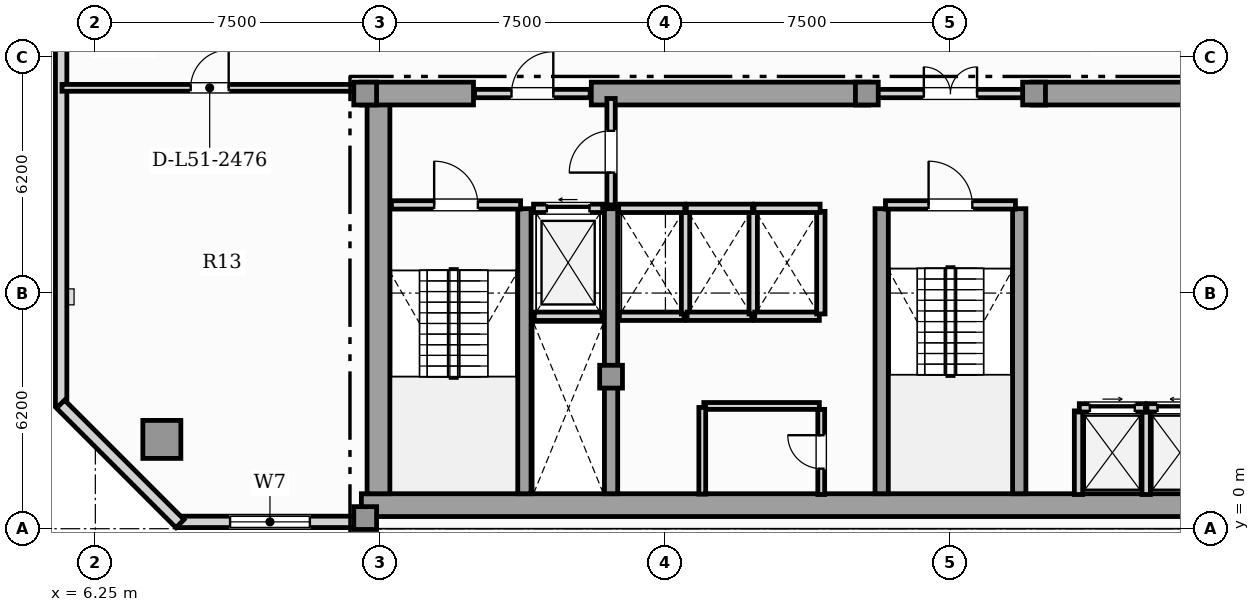
"""IFC4 building model, lengths in metres.
Left out: names, types, materials, properties, quantities, classifications, styles, units other than length and angle.
Written with IfcOpenShell. Run it as: python <this file> out.ifc"""

import sys

from ifc_helpers import new_model, si_unit, direction, frame, frame_2d, origin, origin_2d, place, context, subcontext, project, spatial, rectangle, hollow_rectangle, extrude, element, fill, save


model = new_model("IFC4")
c1 = context("Model", 3, precision=1e-05, world=origin(), true_north=direction((0.0, 1.0)))
c2 = subcontext(c1, "Body", "Model", "MODEL_VIEW")
j1 = project(units=[si_unit("LENGTHUNIT", "METRE"), si_unit("PLANEANGLEUNIT", "RADIAN")], contexts=[c1])
p1 = place(None, origin())
s1 = spatial("IfcSite", under=j1, at=p1, CompositionType="ELEMENT")
p2 = place(p1, origin())
s2 = spatial("IfcBuilding", under=s1, at=p2, CompositionType="ELEMENT")
p3 = place(p2, frame((0.0, 0.0, 208.0)))
s3 = spatial("IfcBuildingStorey", under=s2, at=p3, CompositionType="ELEMENT", Elevation=208.0)
p4 = place(p3, frame((13.25, 0.62, 0.0), z_axis=(0.0, 0.0, 1.0), x_axis=(1.0, 0.0, 0.0)))
e1 = element("IfcWall", 1, at=p4, inside=s3, PredefinedType="SHEAR", context=c2, shape_type="SweptSolid", body=[
    extrude(rectangle(XDim=31.0, YDim=0.6, at=frame_2d((15.5, 0.0))), origin(), (0.0, 0.0, 1.0), 3.63),
])
p5 = place(p3, frame((13.7, 0.92, 0.0), z_axis=(0.0, 0.0, 1.0), x_axis=(0.0, 1.0, 0.0)))
e2 = element("IfcWall", 2, at=p5, inside=s3, PredefinedType="SHEAR", context=c2, shape_type="SweptSolid", body=[
    extrude(rectangle(XDim=10.53, YDim=0.6, at=frame_2d((5.265, 0.0))), origin(), (0.0, 0.0, 1.0), 3.63),
])
p6 = place(p3, frame((13.25, 11.45, 0.0), z_axis=(0.0, 0.0, 1.0), x_axis=(1.0, 0.0, 0.0)))
e3 = element("IfcWall", 3, at=p6, inside=s3, PredefinedType="SHEAR", context=c2, shape_type="SweptSolid", body=[
    extrude(rectangle(XDim=2.95, YDim=0.6, at=frame_2d((1.475, 0.0))), origin(), (0.0, 0.0, 1.0), 3.63),
])
for number, where, z_axis, x_axis in (
    (4, (19.3, 11.45, 0.0), (0.0, 0.0, 1.0), (1.0, 0.0, 0.0)),
    (5, (30.9, 11.45, 0.0), (0.0, 0.0, 1.0), (1.0, 0.0, 0.0)),
):
    element("IfcWall", number, at=place(p3, frame(where, z_axis=z_axis, x_axis=x_axis)), inside=s3, PredefinedType="SHEAR", context=c2, shape_type="SweptSolid", body=[
        extrude(rectangle(XDim=7.3, YDim=0.6, at=frame_2d((3.65, 0.0))), origin(), (0.0, 0.0, 1.0), 3.63),
    ])
for number, where, z_axis, x_axis in (
    (6, (17.54, 0.92, 0.0), (0.0, 0.0, 1.0), (0.0, 1.0, 0.0)),
    (7, (19.82, 0.92, 0.0), (0.0, 0.0, 1.0), (0.0, 1.0, 0.0)),
    (8, (26.94, 0.92, 0.0), (0.0, 0.0, 1.0), (0.0, 1.0, 0.0)),
    (9, (30.56, 0.92, 0.0), (0.0, 0.0, 1.0), (0.0, 1.0, 0.0)),
):
    element("IfcWall", number, at=place(p3, frame(where, z_axis=z_axis, x_axis=x_axis)), inside=s3, PredefinedType="SHEAR", context=c2, shape_type="SweptSolid", body=[
        extrude(rectangle(XDim=7.5, YDim=0.35, at=frame_2d((3.75, 0.0))), origin(), (0.0, 0.0, 1.0), 3.63),
    ])
for number, where, z_axis, x_axis in (
    (10, (13.35, 0.28, 0.0), (0.0, 0.0, 1.0), (1.0, 0.0, 0.0)),
    (11, (13.35, 11.45, 0.0), (0.0, 0.0, 1.0), (1.0, 0.0, 0.0)),
    (12, (19.82, 4.0, 0.0), (0.0, 0.0, 1.0), (1.0, 0.0, 0.0)),
    (13, (26.55, 11.45, 0.0), (0.0, 0.0, 1.0), (1.0, 0.0, 0.0)),
    (14, (30.95, 11.45, 0.0), (0.0, 0.0, 1.0), (1.0, 0.0, 0.0)),
):
    element("IfcColumn", number, at=place(p3, frame(where, z_axis=z_axis, x_axis=x_axis)), inside=s3, PredefinedType="COLUMN", context=c2, shape_type="SweptSolid", body=[
        extrude(rectangle(XDim=0.6, YDim=0.6, at=origin_2d()), origin(), (0.0, 0.0, 1.0), 3.85),
    ])
p7 = place(p3, frame((8.0, 2.35, 0.0), z_axis=(0.0, 0.0, 1.0), x_axis=(1.0, 0.0, 0.0)))
e15 = element("IfcColumn", 15, at=p7, inside=s3, PredefinedType="USERDEFINED", context=c2, shape_type="SweptSolid", body=[
    extrude(hollow_rectangle(XDim=1.0, YDim=1.0, WallThickness=0.06, at=origin_2d()), origin(), (0.0, 0.0, 1.0), 3.85),
])
p8 = place(p3, frame((8.44, 0.18, 0.0), z_axis=(0.0, 0.0, 1.0), x_axis=(1.0, 0.0, 0.0)))
e16 = element("IfcWall", 16, at=p8, inside=s3, PredefinedType="SOLIDWALL", context=c2, shape_type="SweptSolid", body=[
    extrude(rectangle(XDim=4.81, YDim=0.3, at=frame_2d((2.405, 0.0))), origin(), (0.0, 0.0, 1.0), 3.63),
])
p9 = place(p8, frame((1.355, 0.0, 0.85)))
e17 = element("IfcOpeningElement", 17, at=p9, cuts=e16, PredefinedType="OPENING", context=c2, shape_type="SweptSolid", body=[
    extrude(rectangle(XDim=2.1, YDim=2.05, at=frame_2d((1.05, 1.025))), frame((0.0, 0.16, 0.0), z_axis=(0.0, -1.0, 0.0), x_axis=(1.0, 0.0, 0.0)), (0.0, 0.0, 1.0), 0.32),
])
p10 = place(p3, frame((5.35, 37.16, 0.0), z_axis=(0.0, 0.0, 1.0), x_axis=(0.0, -1.0, 0.0)))
e18 = element("IfcWall", 18, at=p10, inside=s3, PredefinedType="SOLIDWALL", context=c2, shape_type="SweptSolid", body=[
    extrude(rectangle(XDim=33.92, YDim=0.3, at=frame_2d((16.96, 0.0))), origin(), (0.0, 0.0, 1.0), 3.63),
])
p11 = place(p10, frame((2.46, 0.0, 0.95)))
e19 = element("IfcOpeningElement", 19, at=p11, cuts=e18, PredefinedType="OPENING", context=c2, shape_type="SweptSolid", body=[
    extrude(rectangle(XDim=0.9, YDim=1.5, at=frame_2d((0.45, 0.75))), frame((0.0, 0.16, 0.0), z_axis=(0.0, -1.0, 0.0), x_axis=(1.0, 0.0, 0.0)), (0.0, 0.0, 1.0), 0.32),
])
p12 = place(p10, frame((17.639, 0.0, 0.88)))
e20 = element("IfcOpeningElement", 20, at=p12, cuts=e18, PredefinedType="OPENING", context=c2, shape_type="SweptSolid", body=[
    extrude(rectangle(XDim=1.65, YDim=2.0, at=frame_2d((0.825, 1.0))), frame((0.0, 0.16, 0.0), z_axis=(0.0, -1.0, 0.0), x_axis=(1.0, 0.0, 0.0)), (0.0, 0.0, 1.0), 0.32),
])
p13 = place(p10, frame((9.212, 0.0, 0.88)))
e21 = element("IfcOpeningElement", 21, at=p13, cuts=e18, PredefinedType="OPENING", context=c2, shape_type="SweptSolid", body=[
    extrude(rectangle(XDim=1.65, YDim=2.0, at=frame_2d((0.825, 1.0))), frame((0.0, 0.16, 0.0), z_axis=(0.0, -1.0, 0.0), x_axis=(1.0, 0.0, 0.0)), (0.0, 0.0, 1.0), 0.32),
])
p14 = place(p3, frame((5.334, 3.278, 0.0), z_axis=(0.0, 0.0, 1.0), x_axis=(0.707106781187, -0.707106781187, 0.0)))
e22 = element("IfcWall", 22, at=p14, inside=s3, PredefinedType="SOLIDWALL", context=c2, shape_type="SweptSolid", body=[
    extrude(rectangle(XDim=4.445, YDim=0.3, at=frame_2d((2.223, 0.0))), origin(), (0.0, 0.0, 1.0), 3.63),
])
p15 = place(p3, frame((17.8, 5.59, 0.0), z_axis=(0.0, 0.0, 1.0), x_axis=(1.0, 0.0, 0.0)))
e23 = element("IfcWall", 23, at=p15, inside=s3, PredefinedType="SOLIDWALL", context=c2, shape_type="SweptSolid", body=[
    extrude(rectangle(XDim=1.78, YDim=0.22, at=frame_2d((0.89, 0.0))), origin(), (0.0, 0.0, 1.0), 3.63),
])
p16 = place(p3, frame((17.78, 8.43, 0.0), z_axis=(0.0, 0.0, 1.0), x_axis=(1.0, 0.0, 0.0)))
e24 = element("IfcWall", 24, at=p16, inside=s3, PredefinedType="SOLIDWALL", context=c2, shape_type="SweptSolid", body=[
    extrude(rectangle(XDim=1.82, YDim=0.22, at=frame_2d((0.91, 0.0))), origin(), (0.0, 0.0, 1.0), 3.63),
])
p17 = place(p16, frame((0.35, 0.0, 0.0)))
e25 = element("IfcOpeningElement", 25, at=p17, cuts=e24, PredefinedType="OPENING", context=c2, shape_type="SweptSolid", body=[
    extrude(rectangle(XDim=1.12, YDim=2.25, at=frame_2d((0.56, 1.125))), frame((0.0, 0.12, 0.0), z_axis=(0.0, -1.0, 0.0), x_axis=(1.0, 0.0, 0.0)), (0.0, 0.0, 1.0), 0.24),
])
for number, where, z_axis, x_axis in (
    (26, (32.12, 0.9, 0.0), (0.0, 0.0, 1.0), (0.0, 1.0, 0.0)),
    (27, (33.9, 0.9, 0.0), (0.0, 0.0, 1.0), (0.0, 1.0, 0.0)),
):
    element("IfcWall", number, at=place(p3, frame(where, z_axis=z_axis, x_axis=x_axis)), inside=s3, PredefinedType="SOLIDWALL", context=c2, shape_type="SweptSolid", body=[
        extrude(rectangle(XDim=2.2, YDim=0.22, at=frame_2d((1.1, 0.0))), origin(), (0.0, 0.0, 1.0), 3.63),
    ])
p18 = place(p3, frame((32.14, 3.18, 0.0), z_axis=(0.0, 0.0, 1.0), x_axis=(1.0, 0.0, 0.0)))
e28 = element("IfcWall", 28, at=p18, inside=s3, PredefinedType="SOLIDWALL", context=c2, shape_type="SweptSolid", body=[
    extrude(rectangle(XDim=1.74, YDim=0.22, at=frame_2d((0.87, 0.0))), origin(), (0.0, 0.0, 1.0), 3.63),
])
p19 = place(p18, frame((0.28, 0.0, 0.0)))
e29 = element("IfcOpeningElement", 29, at=p19, cuts=e28, PredefinedType="OPENING", context=c2, shape_type="SweptSolid", body=[
    extrude(rectangle(XDim=1.18, YDim=2.2, at=frame_2d((0.59, 1.1))), frame((0.0, 0.12, 0.0), z_axis=(0.0, -1.0, 0.0), x_axis=(1.0, 0.0, 0.0)), (0.0, 0.0, 1.0), 0.24),
])
p20 = place(p3, frame((33.92, 3.18, 0.0), z_axis=(0.0, 0.0, 1.0), x_axis=(1.0, 0.0, 0.0)))
e30 = element("IfcWall", 30, at=p20, inside=s3, PredefinedType="SOLIDWALL", context=c2, shape_type="SweptSolid", body=[
    extrude(rectangle(XDim=1.74, YDim=0.22, at=frame_2d((0.87, 0.0))), origin(), (0.0, 0.0, 1.0), 3.63),
])
p21 = place(p20, frame((0.28, 0.0, 0.0)))
e31 = element("IfcOpeningElement", 31, at=p21, cuts=e30, PredefinedType="OPENING", context=c2, shape_type="SweptSolid", body=[
    extrude(rectangle(XDim=1.18, YDim=2.2, at=frame_2d((0.59, 1.1))), frame((0.0, 0.12, 0.0), z_axis=(0.0, -1.0, 0.0), x_axis=(1.0, 0.0, 0.0)), (0.0, 0.0, 1.0), 0.24),
])
p22 = place(p3, frame((20.04, 5.59, 0.0), z_axis=(0.0, 0.0, 1.0), x_axis=(1.0, 0.0, 0.0)))
e32 = element("IfcWall", 32, at=p22, inside=s3, PredefinedType="SOLIDWALL", context=c2, shape_type="SweptSolid", body=[
    extrude(rectangle(XDim=1.7, YDim=0.22, at=frame_2d((0.85, 0.0))), origin(), (0.0, 0.0, 1.0), 3.63),
])
p23 = place(p3, frame((21.78, 5.65, 0.0), z_axis=(0.0, 0.0, 1.0), x_axis=(0.0, 1.0, 0.0)))
e33 = element("IfcWall", 33, at=p23, inside=s3, PredefinedType="SOLIDWALL", context=c2, shape_type="SweptSolid", body=[
    extrude(rectangle(XDim=2.7, YDim=0.22, at=frame_2d((1.35, 0.0))), origin(), (0.0, 0.0, 1.0), 3.63),
])
p24 = place(p3, frame((20.02, 8.43, 0.0), z_axis=(0.0, 0.0, 1.0), x_axis=(1.0, 0.0, 0.0)))
e34 = element("IfcWall", 34, at=p24, inside=s3, PredefinedType="SOLIDWALL", context=c2, shape_type="SweptSolid", body=[
    extrude(rectangle(XDim=1.74, YDim=0.22, at=frame_2d((0.87, 0.0))), origin(), (0.0, 0.0, 1.0), 3.63),
])
p25 = place(p3, frame((21.82, 5.59, 0.0), z_axis=(0.0, 0.0, 1.0), x_axis=(1.0, 0.0, 0.0)))
e35 = element("IfcWall", 35, at=p25, inside=s3, PredefinedType="SOLIDWALL", context=c2, shape_type="SweptSolid", body=[
    extrude(rectangle(XDim=1.7, YDim=0.22, at=frame_2d((0.85, 0.0))), origin(), (0.0, 0.0, 1.0), 3.63),
])
p26 = place(p3, frame((23.56, 5.65, 0.0), z_axis=(0.0, 0.0, 1.0), x_axis=(0.0, 1.0, 0.0)))
e36 = element("IfcWall", 36, at=p26, inside=s3, PredefinedType="SOLIDWALL", context=c2, shape_type="SweptSolid", body=[
    extrude(rectangle(XDim=2.7, YDim=0.22, at=frame_2d((1.35, 0.0))), origin(), (0.0, 0.0, 1.0), 3.63),
])
p27 = place(p3, frame((21.8, 8.43, 0.0), z_axis=(0.0, 0.0, 1.0), x_axis=(1.0, 0.0, 0.0)))
e37 = element("IfcWall", 37, at=p27, inside=s3, PredefinedType="SOLIDWALL", context=c2, shape_type="SweptSolid", body=[
    extrude(rectangle(XDim=1.74, YDim=0.22, at=frame_2d((0.87, 0.0))), origin(), (0.0, 0.0, 1.0), 3.63),
])
p28 = place(p3, frame((23.6, 5.59, 0.0), z_axis=(0.0, 0.0, 1.0), x_axis=(1.0, 0.0, 0.0)))
e38 = element("IfcWall", 38, at=p28, inside=s3, PredefinedType="SOLIDWALL", context=c2, shape_type="SweptSolid", body=[
    extrude(rectangle(XDim=1.7, YDim=0.22, at=frame_2d((0.85, 0.0))), origin(), (0.0, 0.0, 1.0), 3.63),
])
p29 = place(p3, frame((25.34, 5.65, 0.0), z_axis=(0.0, 0.0, 1.0), x_axis=(0.0, 1.0, 0.0)))
e39 = element("IfcWall", 39, at=p29, inside=s3, PredefinedType="SOLIDWALL", context=c2, shape_type="SweptSolid", body=[
    extrude(rectangle(XDim=2.7, YDim=0.22, at=frame_2d((1.35, 0.0))), origin(), (0.0, 0.0, 1.0), 3.63),
])
p30 = place(p3, frame((23.58, 8.43, 0.0), z_axis=(0.0, 0.0, 1.0), x_axis=(1.0, 0.0, 0.0)))
e40 = element("IfcWall", 40, at=p30, inside=s3, PredefinedType="SOLIDWALL", context=c2, shape_type="SweptSolid", body=[
    extrude(rectangle(XDim=1.74, YDim=0.22, at=frame_2d((0.87, 0.0))), origin(), (0.0, 0.0, 1.0), 3.63),
])
p31 = place(p3, frame((14.04, 8.52, 0.0), z_axis=(0.0, 0.0, 1.0), x_axis=(1.0, 0.0, 0.0)))
e41 = element("IfcWall", 41, at=p31, inside=s3, PredefinedType="SOLIDWALL", context=c2, shape_type="SweptSolid", body=[
    extrude(rectangle(XDim=3.4, YDim=0.22, at=frame_2d((1.7, 0.0))), origin(), (0.0, 0.0, 1.0), 3.63),
])
p32 = place(p31, frame((1.125, 0.0, 0.0)))
e42 = element("IfcOpeningElement", 42, at=p32, cuts=e41, PredefinedType="OPENING", context=c2, shape_type="SweptSolid", body=[
    extrude(rectangle(XDim=1.15, YDim=2.2, at=frame_2d((0.575, 1.1))), frame((0.0, 0.12, 0.0), z_axis=(0.0, -1.0, 0.0), x_axis=(1.0, 0.0, 0.0)), (0.0, 0.0, 1.0), 0.24),
])
p33 = place(p3, frame((27.04, 8.52, 0.0), z_axis=(0.0, 0.0, 1.0), x_axis=(1.0, 0.0, 0.0)))
e43 = element("IfcWall", 43, at=p33, inside=s3, PredefinedType="SOLIDWALL", context=c2, shape_type="SweptSolid", body=[
    extrude(rectangle(XDim=3.42, YDim=0.22, at=frame_2d((1.71, 0.0))), origin(), (0.0, 0.0, 1.0), 3.63),
])
p34 = place(p33, frame((1.135, 0.0, 0.0)))
e44 = element("IfcOpeningElement", 44, at=p34, cuts=e43, PredefinedType="OPENING", context=c2, shape_type="SweptSolid", body=[
    extrude(rectangle(XDim=1.15, YDim=2.2, at=frame_2d((0.575, 1.1))), frame((0.0, 0.12, 0.0), z_axis=(0.0, -1.0, 0.0), x_axis=(1.0, 0.0, 0.0)), (0.0, 0.0, 1.0), 0.24),
])
p35 = place(p3, frame((19.82, 8.52, 0.0), z_axis=(0.0, 0.0, 1.0), x_axis=(0.0, 1.0, 0.0)))
e45 = element("IfcWall", 45, at=p35, inside=s3, PredefinedType="SOLIDWALL", context=c2, shape_type="SweptSolid", body=[
    extrude(rectangle(XDim=2.8, YDim=0.22, at=frame_2d((1.4, 0.0))), origin(), (0.0, 0.0, 1.0), 3.085),
])
p36 = place(p35, frame((0.85, 0.0, 0.0)))
e46 = element("IfcOpeningElement", 46, at=p36, cuts=e45, PredefinedType="OPENING", context=c2, shape_type="SweptSolid", body=[
    extrude(rectangle(XDim=1.1, YDim=2.2, at=frame_2d((0.55, 1.1))), frame((0.0, 0.12, 0.0), z_axis=(0.0, -1.0, 0.0), x_axis=(1.0, 0.0, 0.0)), (0.0, 0.0, 1.0), 0.24),
])
p37 = place(p3, frame((16.23, 11.45, 0.0), z_axis=(0.0, 0.0, 1.0), x_axis=(1.0, 0.0, 0.0)))
e47 = element("IfcWall", 47, at=p37, inside=s3, PredefinedType="SOLIDWALL", context=c2, shape_type="SweptSolid", body=[
    extrude(rectangle(XDim=3.04, YDim=0.22, at=frame_2d((1.52, 0.0))), origin(), (0.0, 0.0, 1.0), 3.63),
])
p38 = place(p37, frame((0.97, 0.0, 0.0)))
e48 = element("IfcOpeningElement", 48, at=p38, cuts=e47, PredefinedType="OPENING", context=c2, shape_type="SweptSolid", body=[
    extrude(rectangle(XDim=1.1, YDim=2.2, at=frame_2d((0.55, 1.1))), frame((0.0, 0.12, 0.0), z_axis=(0.0, -1.0, 0.0), x_axis=(1.0, 0.0, 0.0)), (0.0, 0.0, 1.0), 0.24),
])
p39 = place(p3, frame((26.63, 11.45, 0.0), z_axis=(0.0, 0.0, 1.0), x_axis=(1.0, 0.0, 0.0)))
e49 = element("IfcWall", 49, at=p39, inside=s3, PredefinedType="SOLIDWALL", context=c2, shape_type="SweptSolid", body=[
    extrude(rectangle(XDim=4.24, YDim=0.22, at=frame_2d((2.12, 0.0))), origin(), (0.0, 0.0, 1.0), 3.63),
])
p40 = place(p39, frame((1.42, 0.0, 0.0)))
e50 = element("IfcOpeningElement", 50, at=p40, cuts=e49, PredefinedType="OPENING", context=c2, shape_type="SweptSolid", body=[
    extrude(rectangle(XDim=1.4, YDim=2.2, at=frame_2d((0.7, 1.1))), frame((0.0, 0.12, 0.0), z_axis=(0.0, -1.0, 0.0), x_axis=(1.0, 0.0, 0.0)), (0.0, 0.0, 1.0), 0.24),
])
p41 = place(p3, frame((25.35, 0.9, 0.0), z_axis=(0.0, 0.0, 1.0), x_axis=(0.0, 1.0, 0.0)))
e51 = element("IfcWall", 51, at=p41, inside=s3, PredefinedType="PARTITIONING", context=c2, shape_type="SweptSolid", body=[
    extrude(rectangle(XDim=2.24, YDim=0.18, at=frame_2d((1.12, 0.0))), origin(), (0.0, 0.0, 1.0), 3.63),
])
p42 = place(p41, frame((0.68, 0.0, 0.0)))
e52 = element("IfcOpeningElement", 52, at=p42, cuts=e51, PredefinedType="OPENING", context=c2, shape_type="SweptSolid", body=[
    extrude(rectangle(XDim=0.88, YDim=2.05, at=frame_2d((0.44, 1.025))), frame((0.0, 0.1, 0.0), z_axis=(0.0, -1.0, 0.0), x_axis=(1.0, 0.0, 0.0)), (0.0, 0.0, 1.0), 0.2),
])
p43 = place(p3, frame((22.26, 3.23, 0.0), z_axis=(0.0, 0.0, 1.0), x_axis=(1.0, 0.0, 0.0)))
e53 = element("IfcWall", 53, at=p43, inside=s3, PredefinedType="PARTITIONING", context=c2, shape_type="SweptSolid", body=[
    extrude(rectangle(XDim=3.04, YDim=0.18, at=frame_2d((1.52, 0.0))), origin(), (0.0, 0.0, 1.0), 3.63),
])
p44 = place(p3, frame((22.22, 0.91, 0.0), z_axis=(0.0, 0.0, 1.0), x_axis=(0.0, 1.0, 0.0)))
e54 = element("IfcWall", 54, at=p44, inside=s3, PredefinedType="PARTITIONING", context=c2, shape_type="SweptSolid", body=[
    extrude(rectangle(XDim=2.28, YDim=0.18, at=frame_2d((1.14, 0.0))), origin(), (0.0, 0.0, 1.0), 3.63),
])
p45 = place(p3, frame((5.373, 11.6, 0.0), z_axis=(0.0, 0.0, 1.0), x_axis=(1.0, 0.0, 0.0)))
e55 = element("IfcWall", 55, at=p45, inside=s3, PredefinedType="PARTITIONING", context=c2, shape_type="SweptSolid", body=[
    extrude(rectangle(XDim=7.772, YDim=0.18, at=frame_2d((3.886, 0.0))), origin(), (0.0, 0.0, 1.0), 3.63),
])
p46 = place(p45, frame((3.386, 0.0, 0.0)))
e56 = element("IfcOpeningElement", 56, at=p46, cuts=e55, PredefinedType="OPENING", context=c2, shape_type="SweptSolid", body=[
    extrude(rectangle(XDim=1.0, YDim=2.15, at=frame_2d((0.5, 1.075))), frame((0.0, 0.1, 0.0), z_axis=(0.0, -1.0, 0.0), x_axis=(1.0, 0.0, 0.0)), (0.0, 0.0, 1.0), 0.2),
])
p47 = place(p9, origin())
e57 = element("IfcWindow", 57, at=p47, inside=s3, PartitioningType="SINGLE_PANEL", PredefinedType="WINDOW", context=c2, shape_type="SweptSolid", body=[
    extrude(rectangle(XDim=2.1, YDim=2.05, at=frame_2d((1.05, 1.025))), frame((0.0, 0.03, 0.0), z_axis=(0.0, -1.0, 0.0), x_axis=(1.0, 0.0, 0.0)), (0.0, 0.0, 1.0), 0.06),
])
fill(e17, e57)
p48 = place(p17, origin())
e58 = element("IfcDoor", 58, at=p48, inside=s3, OperationType="SLIDING_TO_LEFT", PredefinedType="DOOR", context=c2, shape_type="SweptSolid", body=[
    extrude(rectangle(XDim=1.12, YDim=2.25, at=frame_2d((0.56, 1.125))), frame((0.0, 0.025, 0.0), z_axis=(0.0, -1.0, 0.0), x_axis=(1.0, 0.0, 0.0)), (0.0, 0.0, 1.0), 0.05),
])
fill(e25, e58)
p49 = place(p19, origin())
e59 = element("IfcDoor", 59, at=p49, inside=s3, OperationType="SLIDING_TO_RIGHT", PredefinedType="DOOR", context=c2, shape_type="SweptSolid", body=[
    extrude(rectangle(XDim=1.18, YDim=2.2, at=frame_2d((0.59, 1.1))), frame((0.0, 0.025, 0.0), z_axis=(0.0, -1.0, 0.0), x_axis=(1.0, 0.0, 0.0)), (0.0, 0.0, 1.0), 0.05),
])
fill(e29, e59)
p50 = place(p21, origin())
e60 = element("IfcDoor", 60, at=p50, inside=s3, OperationType="SLIDING_TO_LEFT", PredefinedType="DOOR", context=c2, shape_type="SweptSolid", body=[
    extrude(rectangle(XDim=1.18, YDim=2.2, at=frame_2d((0.59, 1.1))), frame((0.0, 0.025, 0.0), z_axis=(0.0, -1.0, 0.0), x_axis=(1.0, 0.0, 0.0)), (0.0, 0.0, 1.0), 0.05),
])
fill(e31, e60)
p51 = place(p32, origin())
e61 = element("IfcDoor", 61, at=p51, inside=s3, OperationType="SINGLE_SWING_LEFT", PredefinedType="DOOR", context=c2, shape_type="SweptSolid", body=[
    extrude(rectangle(XDim=1.15, YDim=2.2, at=frame_2d((0.575, 1.1))), frame((0.0, 0.025, 0.0), z_axis=(0.0, -1.0, 0.0), x_axis=(1.0, 0.0, 0.0)), (0.0, 0.0, 1.0), 0.05),
])
fill(e42, e61)
p52 = place(p34, origin())
e62 = element("IfcDoor", 62, at=p52, inside=s3, OperationType="SINGLE_SWING_LEFT", PredefinedType="DOOR", context=c2, shape_type="SweptSolid", body=[
    extrude(rectangle(XDim=1.15, YDim=2.2, at=frame_2d((0.575, 1.1))), frame((0.0, 0.025, 0.0), z_axis=(0.0, -1.0, 0.0), x_axis=(1.0, 0.0, 0.0)), (0.0, 0.0, 1.0), 0.05),
])
fill(e44, e62)
p53 = place(p36, origin())
e63 = element("IfcDoor", 63, at=p53, inside=s3, OperationType="SINGLE_SWING_LEFT", PredefinedType="DOOR", context=c2, shape_type="SweptSolid", body=[
    extrude(rectangle(XDim=1.1, YDim=2.2, at=frame_2d((0.55, 1.1))), frame((0.0, 0.025, 0.0), z_axis=(0.0, -1.0, 0.0), x_axis=(1.0, 0.0, 0.0)), (0.0, 0.0, 1.0), 0.05),
])
fill(e46, e63)
p54 = place(p38, origin())
e64 = element("IfcDoor", 64, at=p54, inside=s3, OperationType="SINGLE_SWING_RIGHT", PredefinedType="DOOR", context=c2, shape_type="SweptSolid", body=[
    extrude(rectangle(XDim=1.1, YDim=2.2, at=frame_2d((0.55, 1.1))), frame((0.0, 0.025, 0.0), z_axis=(0.0, -1.0, 0.0), x_axis=(1.0, 0.0, 0.0)), (0.0, 0.0, 1.0), 0.05),
])
fill(e48, e64)
p55 = place(p40, origin())
e65 = element("IfcDoor", 65, at=p55, inside=s3, OperationType="DOUBLE_DOOR_SINGLE_SWING", PredefinedType="DOOR", context=c2, shape_type="SweptSolid", body=[
    extrude(rectangle(XDim=1.4, YDim=2.2, at=frame_2d((0.7, 1.1))), frame((0.0, 0.025, 0.0), z_axis=(0.0, -1.0, 0.0), x_axis=(1.0, 0.0, 0.0)), (0.0, 0.0, 1.0), 0.05),
])
fill(e50, e65)
p56 = place(p42, origin())
e66 = element("IfcDoor", 66, at=p56, inside=s3, OperationType="SINGLE_SWING_RIGHT", PredefinedType="DOOR", context=c2, shape_type="SweptSolid", body=[
    extrude(rectangle(XDim=0.88, YDim=2.05, at=frame_2d((0.44, 1.025))), frame((0.0, 0.025, 0.0), z_axis=(0.0, -1.0, 0.0), x_axis=(1.0, 0.0, 0.0)), (0.0, 0.0, 1.0), 0.05),
])
fill(e52, e66)
p57 = place(p46, origin())
e67 = element("IfcDoor", 67, at=p57, inside=s3, OperationType="SINGLE_SWING_RIGHT", PredefinedType="DOOR", context=c2, shape_type="SweptSolid", body=[
    extrude(rectangle(XDim=1.0, YDim=2.15, at=frame_2d((0.5, 1.075))), frame((0.0, 0.025, 0.0), z_axis=(0.0, -1.0, 0.0), x_axis=(1.0, 0.0, 0.0)), (0.0, 0.0, 1.0), 0.05),
])
fill(e56, e67)
save(model, sys.argv[1])
